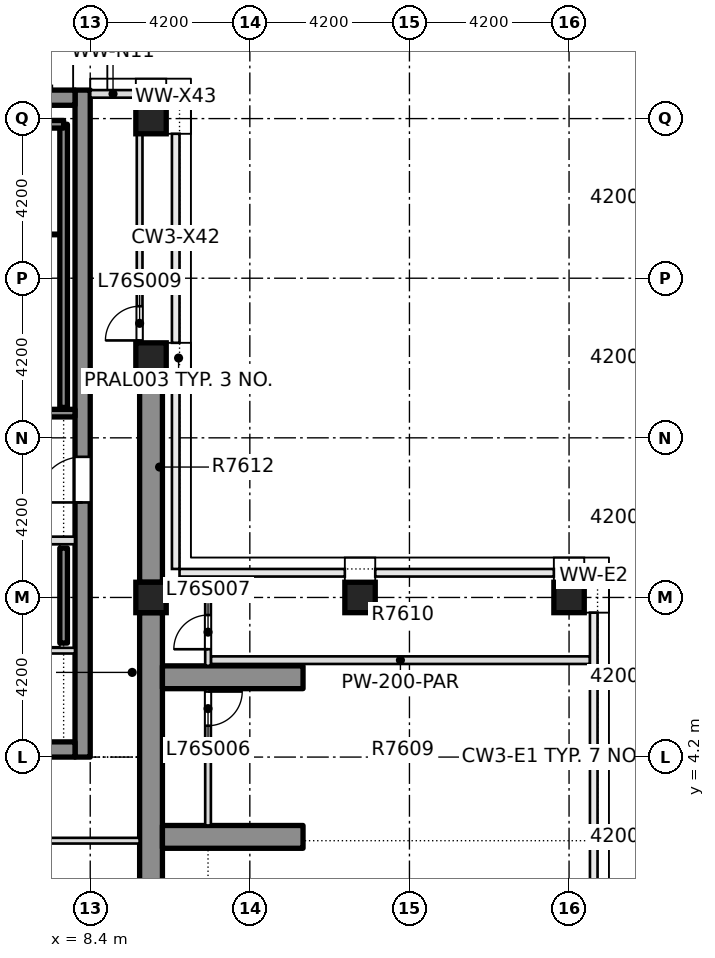
"""IFC4 building model, lengths in metres.
Left out: names, types, materials, properties, quantities, classifications, styles, units other than length and angle.
Written with IfcOpenShell. Run it as: python <this file> out.ifc"""

import sys

from ifc_helpers import new_model, si_unit, direction, frame, frame_2d, origin, origin_2d, place, context, subcontext, project, spatial, rectangle, extrude, element, fill, save


model = new_model("IFC4")
c1 = context("Model", 3, precision=1e-05, world=origin(), true_north=direction((0.0, 1.0)))
c2 = subcontext(c1, "Body", "Model", "MODEL_VIEW")
j1 = project(units=[si_unit("LENGTHUNIT", "METRE"), si_unit("PLANEANGLEUNIT", "RADIAN")], contexts=[c1])
p1 = place(None, origin())
s1 = spatial("IfcSite", under=j1, at=p1, CompositionType="ELEMENT")
p2 = place(p1, origin())
s2 = spatial("IfcBuilding", under=s1, at=p2, CompositionType="ELEMENT")
p3 = place(p2, frame((0.0, 0.0, 293.85)))
s3 = spatial("IfcBuildingStorey", under=s2, at=p3, CompositionType="ELEMENT", Elevation=293.85)
p4 = place(p3, frame((8.2, 4.2, -0.5), z_axis=(0.0, 0.0, 1.0), x_axis=(0.0, 1.0, 0.0)))
e1 = element("IfcWall", 1, at=p4, inside=s3, PredefinedType="SHEAR", context=c2, shape_type="SweptSolid", body=[
    extrude(rectangle(XDim=17.55, YDim=0.4, at=frame_2d((8.775, 0.0))), origin(), (0.0, 0.0, 1.0), 4.5),
])
p5 = place(p4, frame((6.7, 0.0, 0.5)))
e2 = element("IfcOpeningElement", 2, at=p5, cuts=e1, PredefinedType="OPENING", context=c2, shape_type="SweptSolid", body=[
    extrude(rectangle(XDim=1.2, YDim=2.1, at=frame_2d((0.6, 1.05))), frame((0.0, 0.21, 0.0), z_axis=(0.0, -1.0, 0.0), x_axis=(1.0, 0.0, 0.0)), (0.0, 0.0, 1.0), 0.42),
])
for number, where, z_axis, x_axis in (
    (3, (-8.0, 4.4, -0.5), (0.0, 0.0, 1.0), (1.0, 0.0, 0.0)),
    (4, (-8.0, 21.55, -0.5), (0.0, 0.0, 1.0), (1.0, 0.0, 0.0)),
):
    element("IfcWall", number, at=place(p3, frame(where, z_axis=z_axis, x_axis=x_axis)), inside=s3, PredefinedType="SHEAR", context=c2, shape_type="SweptSolid", body=[
        extrude(rectangle(XDim=16.0, YDim=0.4, at=frame_2d((8.0, 0.0))), origin(), (0.0, 0.0, 1.0), 4.5),
    ])
for number, where, z_axis, x_axis in (
    (5, (10.0, 8.4, -0.5), (0.0, 0.0, 1.0), (1.0, 0.0, 0.0)),
    (6, (15.5, 8.4, -0.5), (0.0, 0.0, 1.0), (1.0, 0.0, 0.0)),
    (7, (21.0, 8.4, -0.5), (0.0, 0.0, 1.0), (1.0, 0.0, 0.0)),
    (8, (10.0, 14.7, -0.5), (0.0, 0.0, 1.0), (1.0, 0.0, 0.0)),
    (9, (10.0, 21.0, -0.5), (0.0, 0.0, 1.0), (1.0, 0.0, 0.0)),
):
    element("IfcColumn", number, at=place(p3, frame(where, z_axis=z_axis, x_axis=x_axis)), inside=s3, PredefinedType="COLUMN", context=c2, shape_type="SweptSolid", body=[
        extrude(rectangle(XDim=0.8, YDim=0.8, at=origin_2d()), origin(), (0.0, 0.0, 1.0), 4.5),
    ])
p6 = place(p3, frame((10.0, 0.4, 0.0), z_axis=(0.0, 0.0, 1.0), x_axis=(0.0, 1.0, 0.0)))
e10 = element("IfcWall", 10, at=p6, inside=s3, PredefinedType="SHEAR", context=c2, shape_type="SweptSolid", body=[
    extrude(rectangle(XDim=7.6, YDim=0.6, at=frame_2d((3.8, 0.0))), origin(), (0.0, 0.0, 1.0), 4.0),
])
for number, where, z_axis, x_axis in (
    (11, (10.3, 2.1, 0.0), (0.0, 0.0, 1.0), (1.0, 0.0, 0.0)),
    (12, (10.3, 6.3, 0.0), (0.0, 0.0, 1.0), (1.0, 0.0, 0.0)),
):
    element("IfcWall", number, at=place(p3, frame(where, z_axis=z_axis, x_axis=x_axis)), inside=s3, PredefinedType="SHEAR", context=c2, shape_type="SweptSolid", body=[
        extrude(rectangle(XDim=3.7, YDim=0.6, at=frame_2d((1.85, 0.0))), origin(), (0.0, 0.0, 1.0), 4.0),
    ])
p7 = place(p3, frame((10.0, 8.8, 0.0), z_axis=(0.0, 0.0, 1.0), x_axis=(0.0, 1.0, 0.0)))
e13 = element("IfcWall", 13, at=p7, inside=s3, PredefinedType="SHEAR", context=c2, shape_type="SweptSolid", body=[
    extrude(rectangle(XDim=5.5, YDim=0.6, at=frame_2d((2.75, 0.0))), origin(), (0.0, 0.0, 1.0), 4.0),
])
p8 = place(p3, frame((-9.699, 2.0, 0.0), z_axis=(0.0, 0.0, 1.0), x_axis=(1.0, 0.0, 0.0)))
e14 = element("IfcWall", 14, at=p8, inside=s3, PredefinedType="PARTITIONING", context=c2, shape_type="SweptSolid", body=[
    extrude(rectangle(XDim=19.398, YDim=0.15, at=frame_2d((9.699, 0.0))), origin(), (0.0, 0.0, 1.0), 4.0),
])
p9 = place(p8, frame((8.949, 0.0, 0.0)))
e15 = element("IfcOpeningElement", 15, at=p9, cuts=e14, PredefinedType="OPENING", context=c2, shape_type="SweptSolid", body=[
    extrude(rectangle(XDim=1.5, YDim=2.1, at=frame_2d((0.75, 1.05))), frame((0.0, 0.085, 0.0), z_axis=(0.0, -1.0, 0.0), x_axis=(1.0, 0.0, 0.0)), (0.0, 0.0, 1.0), 0.17),
])
p10 = place(p3, frame((11.575, 6.75, 0.0), z_axis=(0.0, 0.0, 1.0), x_axis=(1.0, 0.0, 0.0)))
e16 = element("IfcWall", 16, at=p10, inside=s3, PredefinedType="PARTITIONING", context=c2, shape_type="SweptSolid", body=[
    extrude(rectangle(XDim=9.975, YDim=0.2, at=frame_2d((4.988, 0.0))), origin(), (0.0, 0.0, 1.0), 4.0),
])
p11 = place(p3, frame((10.301, 8.8, 0.0), z_axis=(0.0, 0.0, 1.0), x_axis=(1.0, 0.0, 0.0)))
e17 = element("IfcWall", 17, at=p11, inside=s3, PredefinedType="PARTITIONING", context=c2, shape_type="SweptSolid", body=[
    extrude(rectangle(XDim=1.299, YDim=0.15, at=frame_2d((0.649, 0.0))), origin(), (0.0, 0.0, 1.0), 4.0),
])
p12 = place(p3, frame((9.7, 14.301, 0.0), z_axis=(0.0, 0.0, 1.0), x_axis=(0.0, 1.0, 0.0)))
e18 = element("IfcWall", 18, at=p12, inside=s3, PredefinedType="PARTITIONING", context=c2, shape_type="SweptSolid", body=[
    extrude(rectangle(XDim=7.249, YDim=0.15, at=frame_2d((3.625, 0.0))), origin(), (0.0, 0.0, 1.0), 4.0),
])
p13 = place(p12, frame((0.862, 0.0, 0.0)))
e19 = element("IfcOpeningElement", 19, at=p13, cuts=e18, PredefinedType="OPENING", context=c2, shape_type="SweptSolid", body=[
    extrude(rectangle(XDim=0.9, YDim=2.1, at=frame_2d((0.45, 1.05))), frame((0.0, 0.085, 0.0), z_axis=(0.0, -1.0, 0.0), x_axis=(1.0, 0.0, 0.0)), (0.0, 0.0, 1.0), 0.17),
])
p14 = place(p3, frame((11.5, 2.401, 0.0), z_axis=(0.0, 0.0, 1.0), x_axis=(0.0, 1.0, 0.0)))
e20 = element("IfcWall", 20, at=p14, inside=s3, PredefinedType="PARTITIONING", context=c2, shape_type="SweptSolid", body=[
    extrude(rectangle(XDim=3.598, YDim=0.15, at=frame_2d((1.799, 0.0))), origin(), (0.0, 0.0, 1.0), 4.0),
])
p15 = place(p14, frame((2.624, 0.0, 0.0)))
e21 = element("IfcOpeningElement", 21, at=p15, cuts=e20, PredefinedType="OPENING", context=c2, shape_type="SweptSolid", body=[
    extrude(rectangle(XDim=0.9, YDim=2.1, at=frame_2d((0.45, 1.05))), frame((0.0, 0.085, 0.0), z_axis=(0.0, -1.0, 0.0), x_axis=(1.0, 0.0, 0.0)), (0.0, 0.0, 1.0), 0.17),
])
p16 = place(p3, frame((11.5, 6.601, 0.0), z_axis=(0.0, 0.0, 1.0), x_axis=(0.0, 1.0, 0.0)))
e22 = element("IfcWall", 22, at=p16, inside=s3, PredefinedType="PARTITIONING", context=c2, shape_type="SweptSolid", body=[
    extrude(rectangle(XDim=2.124, YDim=0.15, at=frame_2d((1.062, 0.0))), origin(), (0.0, 0.0, 1.0), 4.0),
])
p17 = place(p16, frame((0.437, 0.0, 0.0)))
e23 = element("IfcOpeningElement", 23, at=p17, cuts=e22, PredefinedType="OPENING", context=c2, shape_type="SweptSolid", body=[
    extrude(rectangle(XDim=0.9, YDim=2.1, at=frame_2d((0.45, 1.05))), frame((0.0, 0.085, 0.0), z_axis=(0.0, -1.0, 0.0), x_axis=(1.0, 0.0, 0.0)), (0.0, 0.0, 1.0), 0.17),
])
p18 = place(p3, frame((11.5, 8.875, 0.0), z_axis=(0.0, 0.0, 1.0), x_axis=(0.0, 1.0, 0.0)))
e24 = element("IfcWall", 24, at=p18, inside=s3, PredefinedType="PARTITIONING", context=c2, shape_type="SweptSolid", body=[
    extrude(rectangle(XDim=0.075, YDim=0.2, at=frame_2d((0.038, 0.0))), origin(), (0.0, 0.0, 1.0), 4.0),
])
p19 = place(p3, frame((21.65, 8.8, 0.0), z_axis=(0.0, 0.0, 1.0), x_axis=(0.0, 1.0, 0.0)))
e25 = element("IfcWall", 25, at=p19, inside=s3, PredefinedType="STANDARD", context=c2, shape_type="SweptSolid", body=[
    extrude(rectangle(XDim=0.35, YDim=0.2, at=frame_2d((0.175, 0.0))), origin(), (0.0, 0.0, 1.0), 4.0),
])
p20 = place(p3, frame((10.65, 21.4, 0.0), z_axis=(0.0, 0.0, 1.0), x_axis=(0.0, 1.0, 0.0)))
e26 = element("IfcWall", 26, at=p20, inside=s3, PredefinedType="STANDARD", context=c2, shape_type="SweptSolid", body=[
    extrude(rectangle(XDim=0.35, YDim=0.2, at=frame_2d((0.175, 0.0))), origin(), (0.0, 0.0, 1.0), 4.0),
])
p21 = place(p3, frame((9.6, 21.65, 0.0), z_axis=(0.0, 0.0, 1.0), x_axis=(-1.0, 0.0, 0.0)))
e27 = element("IfcWall", 27, at=p21, inside=s3, PredefinedType="STANDARD", context=c2, shape_type="SweptSolid", body=[
    extrude(rectangle(XDim=1.2, YDim=0.2, at=frame_2d((0.6, 0.0))), origin(), (0.0, 0.0, 1.0), 4.0),
])
p22 = place(p3, frame((-7.999, 7.0, 0.0), z_axis=(0.0, 0.0, 1.0), x_axis=(1.0, 0.0, 0.0)))
e28 = element("IfcWall", 28, at=p22, inside=s3, PredefinedType="PARTITIONING", context=c2, shape_type="SweptSolid", body=[
    extrude(rectangle(XDim=15.998, YDim=0.15, at=frame_2d((7.999, 0.0))), origin(), (0.0, 0.0, 1.0), 4.0),
])
p23 = place(p22, frame((7.299, 0.0, 0.0)))
e29 = element("IfcOpeningElement", 29, at=p23, cuts=e28, PredefinedType="OPENING", context=c2, shape_type="SweptSolid", body=[
    extrude(rectangle(XDim=1.4, YDim=2.1, at=frame_2d((0.7, 1.05))), frame((0.0, 0.085, 0.0), z_axis=(0.0, -1.0, 0.0), x_axis=(1.0, 0.0, 0.0)), (0.0, 0.0, 1.0), 0.17),
])
p24 = place(p3, frame((3.6, 9.9, 0.0), z_axis=(0.0, 0.0, 1.0), x_axis=(1.0, 0.0, 0.0)))
e30 = element("IfcWall", 30, at=p24, inside=s3, PredefinedType="PARTITIONING", context=c2, shape_type="SweptSolid", body=[
    extrude(rectangle(XDim=4.399, YDim=0.2, at=frame_2d((2.199, 0.0))), origin(), (0.0, 0.0, 1.0), 4.0),
])
p25 = place(p24, frame((2.25, 0.0, 0.0)))
e31 = element("IfcOpeningElement", 31, at=p25, cuts=e30, PredefinedType="OPENING", context=c2, shape_type="SweptSolid", body=[
    extrude(rectangle(XDim=1.1, YDim=2.1, at=frame_2d((0.55, 1.05))), frame((0.0, 0.11, 0.0), z_axis=(0.0, -1.0, 0.0), x_axis=(1.0, 0.0, 0.0)), (0.0, 0.0, 1.0), 0.22),
])
p26 = place(p3, frame((3.425, 13.25, 0.0), z_axis=(0.0, 0.0, 1.0), x_axis=(1.0, 0.0, 0.0)))
e32 = element("IfcWall", 32, at=p26, inside=s3, PredefinedType="SOLIDWALL", context=c2, shape_type="SweptSolid", body=[
    extrude(rectangle(XDim=4.574, YDim=0.2, at=frame_2d((2.287, 0.0))), origin(), (0.0, 0.0, 1.0), 4.0),
])
p27 = place(p26, frame((1.825, 0.0, 0.0)))
e33 = element("IfcOpeningElement", 33, at=p27, cuts=e32, PredefinedType="OPENING", context=c2, shape_type="SweptSolid", body=[
    extrude(rectangle(XDim=1.2, YDim=2.1, at=frame_2d((0.6, 1.05))), frame((0.0, 0.11, 0.0), z_axis=(0.0, -1.0, 0.0), x_axis=(1.0, 0.0, 0.0)), (0.0, 0.0, 1.0), 0.22),
])
p28 = place(p3, frame((7.7, 13.4, 0.0), z_axis=(0.0, 0.0, 1.0), x_axis=(0.0, 1.0, 0.0)))
e34 = element("IfcWall", 34, at=p28, inside=s3, PredefinedType="SOLIDWALL", context=c2, shape_type="SweptSolid", body=[
    extrude(rectangle(XDim=7.45, YDim=0.2, at=frame_2d((3.725, 0.0))), origin(), (0.0, 0.0, 1.0), 4.0),
])
p29 = place(p3, frame((4.15, 20.85, 0.0), z_axis=(0.0, 0.0, 1.0), x_axis=(1.0, 0.0, 0.0)))
e35 = element("IfcWall", 35, at=p29, inside=s3, PredefinedType="SOLIDWALL", context=c2, shape_type="SweptSolid", body=[
    extrude(rectangle(XDim=3.55, YDim=0.2, at=frame_2d((1.775, 0.0))), origin(), (0.0, 0.0, 1.0), 4.0),
])
p30 = place(p3, frame((7.7, 9.7, 0.0), z_axis=(0.0, 0.0, 1.0), x_axis=(0.0, -1.0, 0.0)))
e36 = element("IfcWall", 36, at=p30, inside=s3, PredefinedType="SOLIDWALL", context=c2, shape_type="SweptSolid", body=[
    extrude(rectangle(XDim=2.5, YDim=0.2, at=frame_2d((1.25, 0.0))), origin(), (0.0, 0.0, 1.0), 4.0),
])
p31 = place(p15, origin())
e37 = element("IfcDoor", 37, at=p31, inside=s3, OperationType="SINGLE_SWING_LEFT", PredefinedType="DOOR", context=c2, shape_type="SweptSolid", body=[
    extrude(rectangle(XDim=0.9, YDim=2.1, at=frame_2d((0.45, 1.05))), frame((0.0, 0.025, 0.0), z_axis=(0.0, -1.0, 0.0), x_axis=(1.0, 0.0, 0.0)), (0.0, 0.0, 1.0), 0.05),
])
fill(e21, e37)
p32 = place(p17, origin())
e38 = element("IfcDoor", 38, at=p32, inside=s3, OperationType="SINGLE_SWING_RIGHT", PredefinedType="DOOR", context=c2, shape_type="SweptSolid", body=[
    extrude(rectangle(XDim=0.9, YDim=2.1, at=frame_2d((0.45, 1.05))), frame((0.0, 0.025, 0.0), z_axis=(0.0, -1.0, 0.0), x_axis=(1.0, 0.0, 0.0)), (0.0, 0.0, 1.0), 0.05),
])
fill(e23, e38)
p33 = place(p13, origin())
e39 = element("IfcDoor", 39, at=p33, inside=s3, OperationType="SINGLE_SWING_RIGHT", PredefinedType="DOOR", context=c2, shape_type="SweptSolid", body=[
    extrude(rectangle(XDim=0.9, YDim=2.1, at=frame_2d((0.45, 1.05))), frame((0.0, 0.025, 0.0), z_axis=(0.0, -1.0, 0.0), x_axis=(1.0, 0.0, 0.0)), (0.0, 0.0, 1.0), 0.05),
])
fill(e19, e39)
p34 = place(p5, origin())
e40 = element("IfcDoor", 40, at=p34, inside=s3, OperationType="SINGLE_SWING_LEFT", PredefinedType="DOOR", context=c2, shape_type="SweptSolid", body=[
    extrude(rectangle(XDim=1.2, YDim=2.1, at=frame_2d((0.6, 1.05))), frame((0.0, 0.025, 0.0), z_axis=(0.0, -1.0, 0.0), x_axis=(1.0, 0.0, 0.0)), (0.0, 0.0, 1.0), 0.05),
])
fill(e2, e40)
save(model, sys.argv[1])
